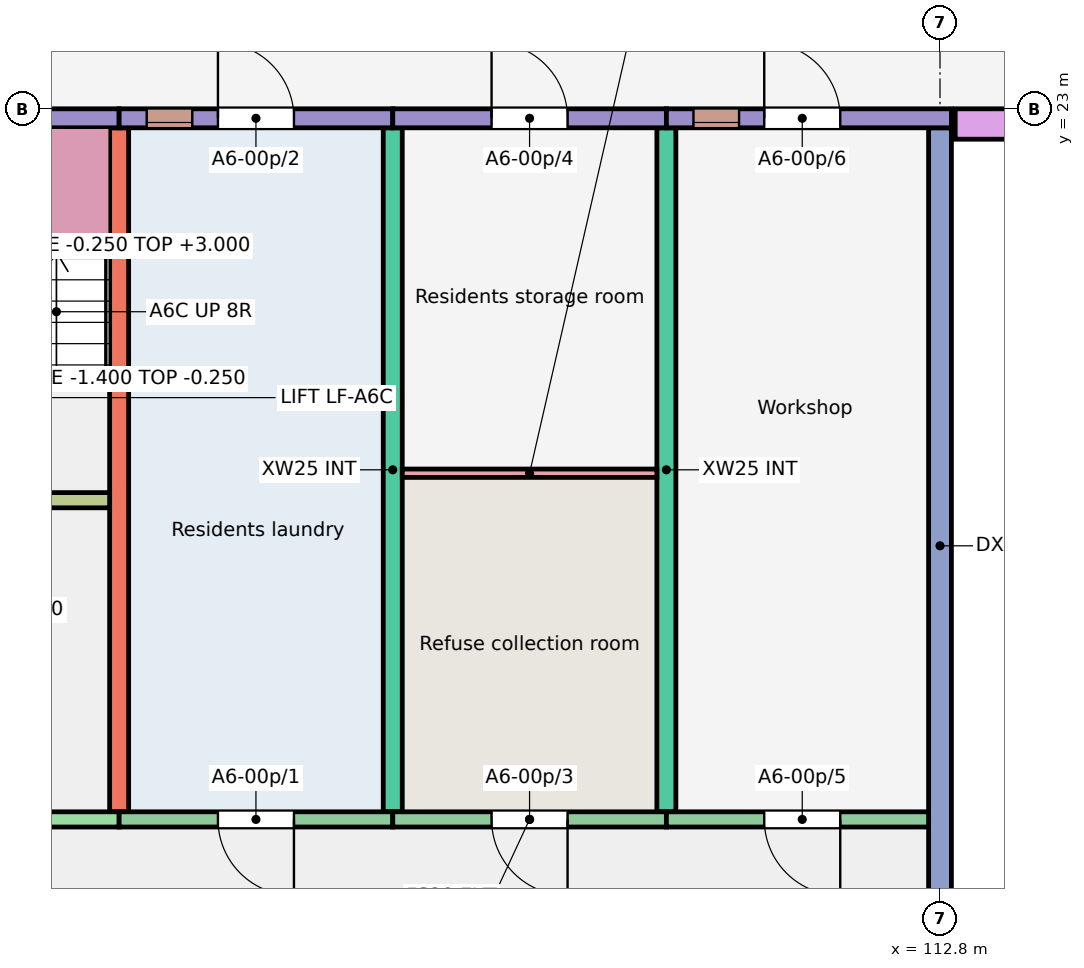
"""IFC4 building model, lengths in metres.
Left out: names, types, materials, properties, quantities, classifications, styles, units other than length and angle.
Written with IfcOpenShell. Run it as: python <this file> out.ifc"""

import sys

from ifc_helpers import new_model, si_unit, direction, frame, frame_2d, origin, place, context, subcontext, project, spatial, rectangle, extrude, element, fill, save


model = new_model("IFC4")
c1 = context("Model", 3, precision=1e-05, world=origin(), true_north=direction((0.0, 1.0)))
c2 = subcontext(c1, "Body", "Model", "MODEL_VIEW")
j1 = project(units=[si_unit("LENGTHUNIT", "METRE"), si_unit("PLANEANGLEUNIT", "RADIAN")], contexts=[c1])
p1 = place(None, origin())
s1 = spatial("IfcSite", under=j1, at=p1, CompositionType="ELEMENT")
p2 = place(p1, origin())
s2 = spatial("IfcBuilding", under=s1, at=p2, CompositionType="ELEMENT")
p3 = place(p2, origin())
s3 = spatial("IfcBuildingStorey", under=s2, at=p3, CompositionType="ELEMENT", Elevation=0.0)
for number, where, z_axis, x_axis in (
    (1, (102.0, 13.75, -0.25), (0.0, 0.0, 1.0), (0.0, 1.0, 0.0)),
    (2, (105.6, 13.75, -0.25), (0.0, 0.0, 1.0), (0.0, 1.0, 0.0)),
    (3, (109.2, 13.75, -0.25), (0.0, 0.0, 1.0), (0.0, 1.0, 0.0)),
):
    element("IfcWall", number, at=place(p3, frame(where, z_axis=z_axis, x_axis=x_axis)), inside=s3, PredefinedType="SHEAR", context=c2, shape_type="SweptSolid", body=[
        extrude(rectangle(XDim=9.0, YDim=0.25, at=frame_2d((4.5, 0.0))), origin(), (0.0, 0.0, 1.0), 3.25),
    ])
p4 = place(p3, frame((112.8, 11.75, -0.25), z_axis=(0.0, 0.0, 1.0), x_axis=(0.0, 1.0, 0.0)))
e4 = element("IfcWall", 4, at=p4, inside=s3, PredefinedType="SHEAR", context=c2, shape_type="SweptSolid", body=[
    extrude(rectangle(XDim=11.0, YDim=0.3, at=frame_2d((5.5, 0.0))), origin(), (0.0, 0.0, 1.0), 3.25),
])
p5 = place(p3, frame((96.0, 22.875, -0.25), z_axis=(0.0, 0.0, 1.0), x_axis=(1.0, 0.0, 0.0)))
e5 = element("IfcWall", 5, at=p5, inside=s3, PredefinedType="SOLIDWALL", context=c2, shape_type="SweptSolid", body=[
    extrude(rectangle(XDim=6.0, YDim=0.25, at=frame_2d((3.0, 0.0))), origin(), (0.0, 0.0, 1.0), 3.25),
])
p6 = place(p5, frame((3.875, 0.0, 0.25)))
e6 = element("IfcOpeningElement", 6, at=p6, cuts=e5, PredefinedType="OPENING", context=c2, shape_type="SweptSolid", body=[
    extrude(rectangle(XDim=1.1, YDim=2.1, at=frame_2d((0.55, 1.05))), frame((0.0, 0.135, 0.0), z_axis=(0.0, -1.0, 0.0), x_axis=(1.0, 0.0, 0.0)), (0.0, 0.0, 1.0), 0.27),
])
p7 = place(p3, frame((96.15, 13.65, -0.25), z_axis=(0.0, 0.0, 1.0), x_axis=(1.0, 0.0, 0.0)))
e7 = element("IfcWall", 7, at=p7, inside=s3, PredefinedType="SHEAR", context=c2, shape_type="SweptSolid", body=[
    extrude(rectangle(XDim=5.85, YDim=0.2, at=frame_2d((2.925, 0.0))), origin(), (0.0, 0.0, 1.0), 3.25),
])
p8 = place(p7, frame((2.312, 0.0, 0.25)))
e8 = element("IfcOpeningElement", 8, at=p8, cuts=e7, PredefinedType="OPENING", context=c2, shape_type="SweptSolid", body=[
    extrude(rectangle(XDim=1.1, YDim=2.1, at=frame_2d((0.55, 1.05))), frame((0.0, 0.11, 0.0), z_axis=(0.0, -1.0, 0.0), x_axis=(1.0, 0.0, 0.0)), (0.0, 0.0, 1.0), 0.22),
])
p9 = place(p3, frame((96.15, 17.85, -0.25), z_axis=(0.0, 0.0, 1.0), x_axis=(1.0, 0.0, 0.0)))
e9 = element("IfcWall", 9, at=p9, inside=s3, PredefinedType="SHEAR", context=c2, shape_type="SweptSolid", body=[
    extrude(rectangle(XDim=5.725, YDim=0.2, at=frame_2d((2.863, 0.0))), origin(), (0.0, 0.0, 1.0), 3.25),
])
p10 = place(p9, frame((3.775, 0.0, 0.25)))
e10 = element("IfcOpeningElement", 10, at=p10, cuts=e9, PredefinedType="OPENING", context=c2, shape_type="SweptSolid", body=[
    extrude(rectangle(XDim=1.0, YDim=2.1, at=frame_2d((0.5, 1.05))), frame((0.0, 0.11, 0.0), z_axis=(0.0, -1.0, 0.0), x_axis=(1.0, 0.0, 0.0)), (0.0, 0.0, 1.0), 0.22),
])
p11 = place(p9, frame((0.762, 0.0, 0.25)))
e11 = element("IfcOpeningElement", 11, at=p11, cuts=e9, PredefinedType="OPENING", context=c2, shape_type="SweptSolid", body=[
    extrude(rectangle(XDim=1.1, YDim=2.1, at=frame_2d((0.55, 1.05))), frame((0.0, 0.11, 0.0), z_axis=(0.0, -1.0, 0.0), x_axis=(1.0, 0.0, 0.0)), (0.0, 0.0, 1.0), 0.22),
])
p12 = place(p3, frame((102.0, 22.875, -0.25), z_axis=(0.0, 0.0, 1.0), x_axis=(1.0, 0.0, 0.0)))
e12 = element("IfcWall", 12, at=p12, inside=s3, PredefinedType="SOLIDWALL", context=c2, shape_type="SweptSolid", body=[
    extrude(rectangle(XDim=3.6, YDim=0.25, at=frame_2d((1.8, 0.0))), origin(), (0.0, 0.0, 1.0), 3.25),
])
p13 = place(p12, frame((0.363, 0.0, 2.05)))
e13 = element("IfcOpeningElement", 13, at=p13, cuts=e12, PredefinedType="OPENING", context=c2, shape_type="SweptSolid", body=[
    extrude(rectangle(XDim=0.6, YDim=0.6, at=frame_2d((0.3, 0.3))), frame((0.0, 0.135, 0.0), z_axis=(0.0, -1.0, 0.0), x_axis=(1.0, 0.0, 0.0)), (0.0, 0.0, 1.0), 0.27),
])
p14 = place(p12, frame((1.3, 0.0, 0.25)))
e14 = element("IfcOpeningElement", 14, at=p14, cuts=e12, PredefinedType="OPENING", context=c2, shape_type="SweptSolid", body=[
    extrude(rectangle(XDim=1.0, YDim=2.1, at=frame_2d((0.5, 1.05))), frame((0.0, 0.135, 0.0), z_axis=(0.0, -1.0, 0.0), x_axis=(1.0, 0.0, 0.0)), (0.0, 0.0, 1.0), 0.27),
])
p15 = place(p3, frame((102.0, 13.65, -0.25), z_axis=(0.0, 0.0, 1.0), x_axis=(1.0, 0.0, 0.0)))
e15 = element("IfcWall", 15, at=p15, inside=s3, PredefinedType="SOLIDWALL", context=c2, shape_type="SweptSolid", body=[
    extrude(rectangle(XDim=3.6, YDim=0.2, at=frame_2d((1.8, 0.0))), origin(), (0.0, 0.0, 1.0), 3.25),
])
p16 = place(p15, frame((1.3, 0.0, 0.25)))
e16 = element("IfcOpeningElement", 16, at=p16, cuts=e15, PredefinedType="OPENING", context=c2, shape_type="SweptSolid", body=[
    extrude(rectangle(XDim=1.0, YDim=2.1, at=frame_2d((0.5, 1.05))), frame((0.0, 0.11, 0.0), z_axis=(0.0, -1.0, 0.0), x_axis=(1.0, 0.0, 0.0)), (0.0, 0.0, 1.0), 0.22),
])
p17 = place(p3, frame((105.6, 22.875, -0.25), z_axis=(0.0, 0.0, 1.0), x_axis=(1.0, 0.0, 0.0)))
e17 = element("IfcWall", 17, at=p17, inside=s3, PredefinedType="SOLIDWALL", context=c2, shape_type="SweptSolid", body=[
    extrude(rectangle(XDim=3.6, YDim=0.25, at=frame_2d((1.8, 0.0))), origin(), (0.0, 0.0, 1.0), 3.25),
])
p18 = place(p17, frame((1.3, 0.0, 0.25)))
e18 = element("IfcOpeningElement", 18, at=p18, cuts=e17, PredefinedType="OPENING", context=c2, shape_type="SweptSolid", body=[
    extrude(rectangle(XDim=1.0, YDim=2.1, at=frame_2d((0.5, 1.05))), frame((0.0, 0.135, 0.0), z_axis=(0.0, -1.0, 0.0), x_axis=(1.0, 0.0, 0.0)), (0.0, 0.0, 1.0), 0.27),
])
p19 = place(p3, frame((105.6, 13.65, -0.25), z_axis=(0.0, 0.0, 1.0), x_axis=(1.0, 0.0, 0.0)))
e19 = element("IfcWall", 19, at=p19, inside=s3, PredefinedType="SOLIDWALL", context=c2, shape_type="SweptSolid", body=[
    extrude(rectangle(XDim=3.6, YDim=0.2, at=frame_2d((1.8, 0.0))), origin(), (0.0, 0.0, 1.0), 3.25),
])
p20 = place(p19, frame((1.3, 0.0, 0.25)))
e20 = element("IfcOpeningElement", 20, at=p20, cuts=e19, PredefinedType="OPENING", context=c2, shape_type="SweptSolid", body=[
    extrude(rectangle(XDim=1.0, YDim=2.1, at=frame_2d((0.5, 1.05))), frame((0.0, 0.11, 0.0), z_axis=(0.0, -1.0, 0.0), x_axis=(1.0, 0.0, 0.0)), (0.0, 0.0, 1.0), 0.22),
])
p21 = place(p3, frame((109.2, 22.875, -0.25), z_axis=(0.0, 0.0, 1.0), x_axis=(1.0, 0.0, 0.0)))
e21 = element("IfcWall", 21, at=p21, inside=s3, PredefinedType="SOLIDWALL", context=c2, shape_type="SweptSolid", body=[
    extrude(rectangle(XDim=3.75, YDim=0.25, at=frame_2d((1.875, 0.0))), origin(), (0.0, 0.0, 1.0), 3.25),
])
p22 = place(p21, frame((0.356, 0.0, 2.05)))
e22 = element("IfcOpeningElement", 22, at=p22, cuts=e21, PredefinedType="OPENING", context=c2, shape_type="SweptSolid", body=[
    extrude(rectangle(XDim=0.6, YDim=0.6, at=frame_2d((0.3, 0.3))), frame((0.0, 0.135, 0.0), z_axis=(0.0, -1.0, 0.0), x_axis=(1.0, 0.0, 0.0)), (0.0, 0.0, 1.0), 0.27),
])
p23 = place(p21, frame((1.288, 0.0, 0.25)))
e23 = element("IfcOpeningElement", 23, at=p23, cuts=e21, PredefinedType="OPENING", context=c2, shape_type="SweptSolid", body=[
    extrude(rectangle(XDim=1.0, YDim=2.1, at=frame_2d((0.5, 1.05))), frame((0.0, 0.135, 0.0), z_axis=(0.0, -1.0, 0.0), x_axis=(1.0, 0.0, 0.0)), (0.0, 0.0, 1.0), 0.27),
])
p24 = place(p3, frame((109.2, 13.65, -0.25), z_axis=(0.0, 0.0, 1.0), x_axis=(1.0, 0.0, 0.0)))
e24 = element("IfcWall", 24, at=p24, inside=s3, PredefinedType="SOLIDWALL", context=c2, shape_type="SweptSolid", body=[
    extrude(rectangle(XDim=3.45, YDim=0.2, at=frame_2d((1.725, 0.0))), origin(), (0.0, 0.0, 1.0), 3.25),
])
p25 = place(p24, frame((1.288, 0.0, 0.25)))
e25 = element("IfcOpeningElement", 25, at=p25, cuts=e24, PredefinedType="OPENING", context=c2, shape_type="SweptSolid", body=[
    extrude(rectangle(XDim=1.0, YDim=2.1, at=frame_2d((0.5, 1.05))), frame((0.0, 0.11, 0.0), z_axis=(0.0, -1.0, 0.0), x_axis=(1.0, 0.0, 0.0)), (0.0, 0.0, 1.0), 0.22),
])
p26 = place(p3, frame((113.0, 22.8, -0.25), z_axis=(0.0, 0.0, 1.0), x_axis=(1.0, 0.0, 0.0)))
e26 = element("IfcWall", 26, at=p26, inside=s3, PredefinedType="SOLIDWALL", context=c2, shape_type="SweptSolid", body=[
    extrude(rectangle(XDim=13.8, YDim=0.4, at=frame_2d((6.9, 0.0))), origin(), (0.0, 0.0, 1.0), 3.25),
])
p27 = place(p3, frame((105.725, 18.205, 0.0), z_axis=(0.0, 0.0, 1.0), x_axis=(1.0, 0.0, 0.0)))
e27 = element("IfcWall", 27, at=p27, inside=s3, PredefinedType="PARTITIONING", context=c2, shape_type="SweptSolid", body=[
    extrude(rectangle(XDim=3.35, YDim=0.11, at=frame_2d((1.675, 0.0))), origin(), (0.0, 0.0, 1.0), 2.8),
])
p28 = place(p13, origin())
e28 = element("IfcWindow", 28, at=p28, inside=s3, PartitioningType="SINGLE_PANEL", PredefinedType="WINDOW", context=c2, shape_type="SweptSolid", body=[
    extrude(rectangle(XDim=0.6, YDim=0.6, at=frame_2d((0.3, 0.3))), frame((0.0, -0.025, 0.0), z_axis=(0.0, -1.0, 0.0), x_axis=(1.0, 0.0, 0.0)), (0.0, 0.0, 1.0), 0.06),
])
fill(e13, e28)
p29 = place(p22, origin())
e29 = element("IfcWindow", 29, at=p29, inside=s3, PartitioningType="SINGLE_PANEL", PredefinedType="WINDOW", context=c2, shape_type="SweptSolid", body=[
    extrude(rectangle(XDim=0.6, YDim=0.6, at=frame_2d((0.3, 0.3))), frame((0.0, -0.025, 0.0), z_axis=(0.0, -1.0, 0.0), x_axis=(1.0, 0.0, 0.0)), (0.0, 0.0, 1.0), 0.06),
])
fill(e22, e29)
p30 = place(p16, origin())
e30 = element("IfcDoor", 30, at=p30, inside=s3, OperationType="SINGLE_SWING_RIGHT", PredefinedType="DOOR", context=c2, shape_type="SweptSolid", body=[
    extrude(rectangle(XDim=1.0, YDim=2.1, at=frame_2d((0.5, 1.05))), frame((0.0, 0.025, 0.0), z_axis=(0.0, -1.0, 0.0), x_axis=(1.0, 0.0, 0.0)), (0.0, 0.0, 1.0), 0.05),
])
fill(e16, e30)
p31 = place(p14, origin())
e31 = element("IfcDoor", 31, at=p31, inside=s3, OperationType="SINGLE_SWING_LEFT", PredefinedType="DOOR", context=c2, shape_type="SweptSolid", body=[
    extrude(rectangle(XDim=1.0, YDim=2.1, at=frame_2d((0.5, 1.05))), frame((0.0, 0.025, 0.0), z_axis=(0.0, -1.0, 0.0), x_axis=(1.0, 0.0, 0.0)), (0.0, 0.0, 1.0), 0.05),
])
fill(e14, e31)
p32 = place(p20, origin())
e32 = element("IfcDoor", 32, at=p32, inside=s3, OperationType="SINGLE_SWING_RIGHT", PredefinedType="DOOR", context=c2, shape_type="SweptSolid", body=[
    extrude(rectangle(XDim=1.0, YDim=2.1, at=frame_2d((0.5, 1.05))), frame((0.0, 0.025, 0.0), z_axis=(0.0, -1.0, 0.0), x_axis=(1.0, 0.0, 0.0)), (0.0, 0.0, 1.0), 0.05),
])
fill(e20, e32)
p33 = place(p18, origin())
e33 = element("IfcDoor", 33, at=p33, inside=s3, OperationType="SINGLE_SWING_LEFT", PredefinedType="DOOR", context=c2, shape_type="SweptSolid", body=[
    extrude(rectangle(XDim=1.0, YDim=2.1, at=frame_2d((0.5, 1.05))), frame((0.0, 0.025, 0.0), z_axis=(0.0, -1.0, 0.0), x_axis=(1.0, 0.0, 0.0)), (0.0, 0.0, 1.0), 0.05),
])
fill(e18, e33)
p34 = place(p25, origin())
e34 = element("IfcDoor", 34, at=p34, inside=s3, OperationType="SINGLE_SWING_RIGHT", PredefinedType="DOOR", context=c2, shape_type="SweptSolid", body=[
    extrude(rectangle(XDim=1.0, YDim=2.1, at=frame_2d((0.5, 1.05))), frame((0.0, 0.025, 0.0), z_axis=(0.0, -1.0, 0.0), x_axis=(1.0, 0.0, 0.0)), (0.0, 0.0, 1.0), 0.05),
])
fill(e25, e34)
p35 = place(p23, origin())
e35 = element("IfcDoor", 35, at=p35, inside=s3, OperationType="SINGLE_SWING_LEFT", PredefinedType="DOOR", context=c2, shape_type="SweptSolid", body=[
    extrude(rectangle(XDim=1.0, YDim=2.1, at=frame_2d((0.5, 1.05))), frame((0.0, 0.025, 0.0), z_axis=(0.0, -1.0, 0.0), x_axis=(1.0, 0.0, 0.0)), (0.0, 0.0, 1.0), 0.05),
])
fill(e23, e35)
save(model, sys.argv[1])
